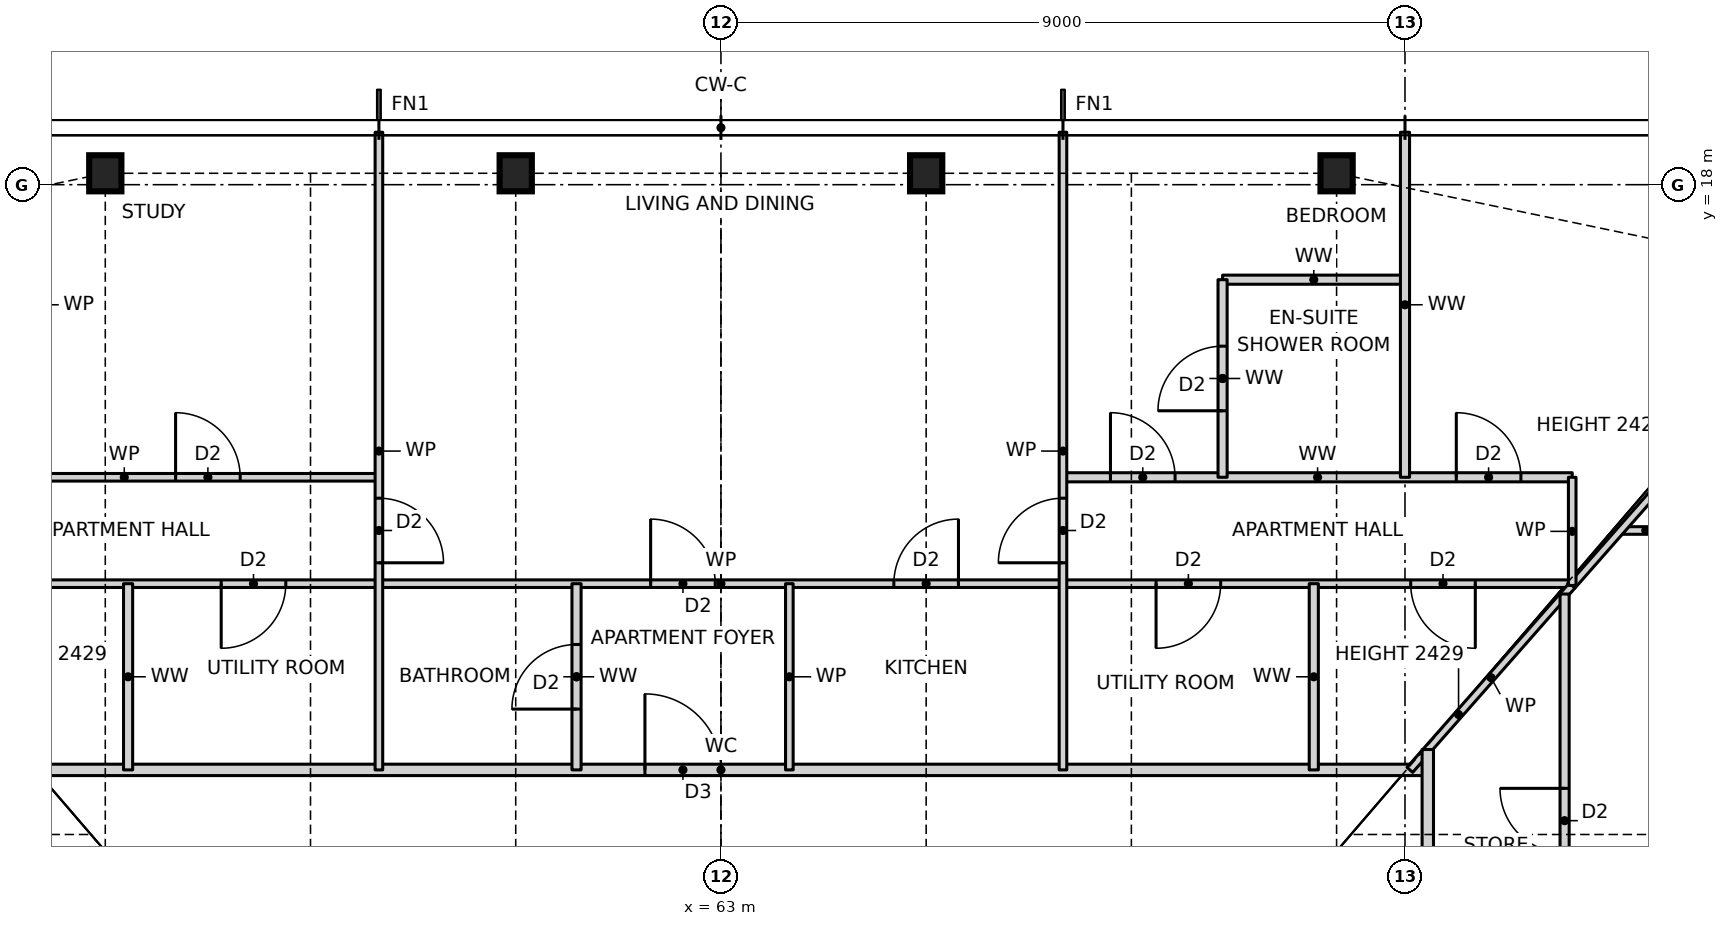
"""IFC4 building model, lengths in metres.
Left out: names, types, materials, properties, quantities, classifications, styles, units other than length and angle.
Written with IfcOpenShell. Run it as: python <this file> out.ifc"""

import sys

from ifc_helpers import new_model, si_unit, direction, frame, frame_2d, origin, origin_2d, place, context, subcontext, project, spatial, rectangle, i_section, extrude, element, fill, save


model = new_model("IFC4")
c1 = context("Model", 3, precision=1e-05, world=origin(), true_north=direction((0.0, 1.0)))
c2 = subcontext(c1, "Body", "Model", "MODEL_VIEW")
j1 = project(units=[si_unit("LENGTHUNIT", "METRE"), si_unit("PLANEANGLEUNIT", "RADIAN")], contexts=[c1])
p1 = place(None, origin())
s1 = spatial("IfcSite", under=j1, at=p1, CompositionType="ELEMENT")
p2 = place(p1, origin())
s2 = spatial("IfcBuilding", under=s1, at=p2, CompositionType="ELEMENT")
p3 = place(p2, frame((0.0, 0.0, 18.5)))
s3 = spatial("IfcBuildingStorey", under=s2, at=p3, CompositionType="ELEMENT", Elevation=18.5)
for number, where, z_axis, x_axis in (
    (1, (71.1, 18.15, 0.0), (0.0, 0.0, 1.0), (1.0, 0.0, 0.0)),
    (2, (65.7, 18.15, 0.0), (0.0, 0.0, 1.0), (1.0, 0.0, 0.0)),
    (3, (60.3, 18.15, 0.0), (0.0, 0.0, 1.0), (1.0, 0.0, 0.0)),
    (4, (54.9, 18.15, 0.0), (0.0, 0.0, 1.0), (1.0, 0.0, 0.0)),
):
    element("IfcColumn", number, at=place(p3, frame(where, z_axis=z_axis, x_axis=x_axis)), inside=s3, PredefinedType="COLUMN", context=c2, shape_type="SweptSolid", body=[
        extrude(i_section(OverallWidth=0.424, OverallDepth=0.475, WebThickness=0.048, FlangeThickness=0.077, at=origin_2d()), origin(), (0.0, 0.0, 1.0), 3.5),
    ])
p4 = place(p3, frame((53.7, 10.3, 0.0), z_axis=(0.0, 0.0, 1.0), x_axis=(1.0, 0.0, 0.0)))
e5 = element("IfcWall", 5, at=p4, inside=s3, PredefinedType="PARTITIONING", context=c2, shape_type="SweptSolid", body=[
    extrude(rectangle(XDim=18.6, YDim=0.15, at=frame_2d((9.3, 0.0))), origin(), (0.0, 0.0, 1.0), 3.27),
])
p5 = place(p4, frame((8.3, 0.0, 0.0)))
e6 = element("IfcOpeningElement", 6, at=p5, cuts=e5, PredefinedType="OPENING", context=c2, shape_type="SweptSolid", body=[
    extrude(rectangle(XDim=1.0, YDim=2.1, at=frame_2d((0.5, 1.05))), frame((0.0, 0.085, 0.0), z_axis=(0.0, -1.0, 0.0), x_axis=(1.0, 0.0, 0.0)), (0.0, 0.0, 1.0), 0.17),
])
p6 = place(p3, frame((51.8, 12.75, 0.0), z_axis=(0.0, 0.0, 1.0), x_axis=(1.0, 0.0, 0.0)))
e7 = element("IfcWall", 7, at=p6, inside=s3, PredefinedType="PARTITIONING", context=c2, shape_type="SweptSolid", body=[
    extrude(rectangle(XDim=22.4, YDim=0.1, at=frame_2d((11.2, 0.0))), origin(), (0.0, 0.0, 1.0), 3.27),
])
p7 = place(p6, frame((13.475, 0.0, 0.0)))
e8 = element("IfcOpeningElement", 8, at=p7, cuts=e7, PredefinedType="OPENING", context=c2, shape_type="SweptSolid", body=[
    extrude(rectangle(XDim=0.85, YDim=2.1, at=frame_2d((0.425, 1.05))), frame((0.0, 0.06, 0.0), z_axis=(0.0, -1.0, 0.0), x_axis=(1.0, 0.0, 0.0)), (0.0, 0.0, 1.0), 0.12),
])
p8 = place(p6, frame((10.275, 0.0, 0.0)))
e9 = element("IfcOpeningElement", 9, at=p8, cuts=e7, PredefinedType="OPENING", context=c2, shape_type="SweptSolid", body=[
    extrude(rectangle(XDim=0.85, YDim=2.1, at=frame_2d((0.425, 1.05))), frame((0.0, 0.06, 0.0), z_axis=(0.0, -1.0, 0.0), x_axis=(1.0, 0.0, 0.0)), (0.0, 0.0, 1.0), 0.12),
])
p9 = place(p6, frame((16.925, 0.0, 0.0)))
e10 = element("IfcOpeningElement", 10, at=p9, cuts=e7, PredefinedType="OPENING", context=c2, shape_type="SweptSolid", body=[
    extrude(rectangle(XDim=0.85, YDim=2.1, at=frame_2d((0.425, 1.05))), frame((0.0, 0.06, 0.0), z_axis=(0.0, -1.0, 0.0), x_axis=(1.0, 0.0, 0.0)), (0.0, 0.0, 1.0), 0.12),
])
p10 = place(p6, frame((20.275, 0.0, 0.0)))
e11 = element("IfcOpeningElement", 11, at=p10, cuts=e7, PredefinedType="OPENING", context=c2, shape_type="SweptSolid", body=[
    extrude(rectangle(XDim=0.85, YDim=2.1, at=frame_2d((0.425, 1.05))), frame((0.0, 0.06, 0.0), z_axis=(0.0, -1.0, 0.0), x_axis=(1.0, 0.0, 0.0)), (0.0, 0.0, 1.0), 0.12),
])
p11 = place(p6, frame((4.625, 0.0, 0.0)))
e12 = element("IfcOpeningElement", 12, at=p11, cuts=e7, PredefinedType="OPENING", context=c2, shape_type="SweptSolid", body=[
    extrude(rectangle(XDim=0.85, YDim=2.1, at=frame_2d((0.425, 1.05))), frame((0.0, 0.06, 0.0), z_axis=(0.0, -1.0, 0.0), x_axis=(1.0, 0.0, 0.0)), (0.0, 0.0, 1.0), 0.12),
])
p12 = place(p6, frame((1.275, 0.0, 0.0)))
e13 = element("IfcOpeningElement", 13, at=p12, cuts=e7, PredefinedType="OPENING", context=c2, shape_type="SweptSolid", body=[
    extrude(rectangle(XDim=0.85, YDim=2.1, at=frame_2d((0.425, 1.05))), frame((0.0, 0.06, 0.0), z_axis=(0.0, -1.0, 0.0), x_axis=(1.0, 0.0, 0.0)), (0.0, 0.0, 1.0), 0.12),
])
p13 = place(p3, frame((74.836, 13.45, 0.0), z_axis=(0.0, 0.0, 1.0), x_axis=(1.0, 0.0, 0.0)))
e14 = element("IfcWall", 14, at=p13, inside=s3, PredefinedType="PARTITIONING", context=c2, shape_type="SweptSolid", body=[
    extrude(rectangle(XDim=0.664, YDim=0.1, at=frame_2d((0.332, 0.0))), origin(), (0.0, 0.0, 1.0), 3.27),
])
p14 = place(p3, frame((51.8, 14.15, 0.0), z_axis=(0.0, 0.0, 1.0), x_axis=(1.0, 0.0, 0.0)))
e15 = element("IfcWall", 15, at=p14, inside=s3, PredefinedType="PARTITIONING", context=c2, shape_type="SweptSolid", body=[
    extrude(rectangle(XDim=6.7, YDim=0.1, at=frame_2d((3.35, 0.0))), origin(), (0.0, 0.0, 1.0), 3.27),
])
p15 = place(p14, frame((4.025, 0.0, 0.0)))
e16 = element("IfcOpeningElement", 16, at=p15, cuts=e15, PredefinedType="OPENING", context=c2, shape_type="SweptSolid", body=[
    extrude(rectangle(XDim=0.85, YDim=2.1, at=frame_2d((0.425, 1.05))), frame((0.0, 0.06, 0.0), z_axis=(0.0, -1.0, 0.0), x_axis=(1.0, 0.0, 0.0)), (0.0, 0.0, 1.0), 0.12),
])
p16 = place(p14, frame((0.675, 0.0, 0.0)))
e17 = element("IfcOpeningElement", 17, at=p16, cuts=e15, PredefinedType="OPENING", context=c2, shape_type="SweptSolid", body=[
    extrude(rectangle(XDim=0.85, YDim=2.1, at=frame_2d((0.425, 1.05))), frame((0.0, 0.06, 0.0), z_axis=(0.0, -1.0, 0.0), x_axis=(1.0, 0.0, 0.0)), (0.0, 0.0, 1.0), 0.12),
])
p17 = place(p3, frame((67.5, 14.15, 0.0), z_axis=(0.0, 0.0, 1.0), x_axis=(1.0, 0.0, 0.0)))
e18 = element("IfcWall", 18, at=p17, inside=s3, PredefinedType="PARTITIONING", context=c2, shape_type="SweptSolid", body=[
    extrude(rectangle(XDim=6.7, YDim=0.12, at=frame_2d((3.35, 0.0))), origin(), (0.0, 0.0, 1.0), 3.27),
])
p18 = place(p17, frame((0.625, 0.0, 0.0)))
e19 = element("IfcOpeningElement", 19, at=p18, cuts=e18, PredefinedType="OPENING", context=c2, shape_type="SweptSolid", body=[
    extrude(rectangle(XDim=0.85, YDim=2.1, at=frame_2d((0.425, 1.05))), frame((0.0, 0.07, 0.0), z_axis=(0.0, -1.0, 0.0), x_axis=(1.0, 0.0, 0.0)), (0.0, 0.0, 1.0), 0.14),
])
p19 = place(p17, frame((5.175, 0.0, 0.0)))
e20 = element("IfcOpeningElement", 20, at=p19, cuts=e18, PredefinedType="OPENING", context=c2, shape_type="SweptSolid", body=[
    extrude(rectangle(XDim=0.85, YDim=2.1, at=frame_2d((0.425, 1.05))), frame((0.0, 0.07, 0.0), z_axis=(0.0, -1.0, 0.0), x_axis=(1.0, 0.0, 0.0)), (0.0, 0.0, 1.0), 0.14),
])
p20 = place(p3, frame((69.6, 16.75, 0.0), z_axis=(0.0, 0.0, 1.0), x_axis=(1.0, 0.0, 0.0)))
e21 = element("IfcWall", 21, at=p20, inside=s3, PredefinedType="PARTITIONING", context=c2, shape_type="SweptSolid", body=[
    extrude(rectangle(XDim=2.4, YDim=0.12, at=frame_2d((1.2, 0.0))), origin(), (0.0, 0.0, 1.0), 3.27),
])
p21 = place(p3, frame((72.064, 10.3, 0.0), z_axis=(0.0, 0.0, 1.0), x_axis=(0.660667046586, 0.75067906162, 0.0)))
e22 = element("IfcWall", 22, at=p21, inside=s3, PredefinedType="PARTITIONING", context=c2, shape_type="SweptSolid", body=[
    extrude(rectangle(XDim=3.233, YDim=0.1, at=frame_2d((1.617, 0.0))), origin(), (0.0, 0.0, 1.0), 2.429),
])
p22 = place(p3, frame((74.2, 12.727, 0.0), z_axis=(0.0, 0.0, 1.0), x_axis=(0.660698595885, 0.750651294141, 0.0)))
e23 = element("IfcWall", 23, at=p22, inside=s3, PredefinedType="PARTITIONING", context=c2, shape_type="SweptSolid", body=[
    extrude(rectangle(XDim=5.838, YDim=0.1, at=frame_2d((2.919, 0.0))), origin(), (0.0, 0.0, 1.0), 2.429),
])
p23 = place(p3, frame((74.2, 12.727, 0.0), z_axis=(0.0, 0.0, 1.0), x_axis=(0.0, 1.0, 0.0)))
e24 = element("IfcWall", 24, at=p23, inside=s3, PredefinedType="PARTITIONING", context=c2, shape_type="SweptSolid", body=[
    extrude(rectangle(XDim=1.423, YDim=0.1, at=frame_2d((0.711, 0.0))), origin(), (0.0, 0.0, 1.0), 3.27),
])
p24 = place(p3, frame((74.1, -12.614, 0.0), z_axis=(0.0, 0.0, 1.0), x_axis=(0.0, 1.0, 0.0)))
e25 = element("IfcWall", 25, at=p24, inside=s3, PredefinedType="PARTITIONING", context=c2, shape_type="SweptSolid", body=[
    extrude(rectangle(XDim=25.228, YDim=0.12, at=frame_2d((12.614, 0.0))), origin(), (0.0, 0.0, 1.0), 3.27),
])
p25 = place(p24, frame((7.239, 0.0, 0.0)))
e26 = element("IfcOpeningElement", 26, at=p25, cuts=e25, PredefinedType="OPENING", context=c2, shape_type="SweptSolid", body=[
    extrude(rectangle(XDim=0.85, YDim=2.1, at=frame_2d((0.425, 1.05))), frame((0.0, 0.07, 0.0), z_axis=(0.0, -1.0, 0.0), x_axis=(1.0, 0.0, 0.0)), (0.0, 0.0, 1.0), 0.14),
])
p26 = place(p24, frame((10.439, 0.0, 0.0)))
e27 = element("IfcOpeningElement", 27, at=p26, cuts=e25, PredefinedType="OPENING", context=c2, shape_type="SweptSolid", body=[
    extrude(rectangle(XDim=0.85, YDim=2.1, at=frame_2d((0.425, 1.05))), frame((0.0, 0.07, 0.0), z_axis=(0.0, -1.0, 0.0), x_axis=(1.0, 0.0, 0.0)), (0.0, 0.0, 1.0), 0.14),
])
p27 = place(p24, frame((2.507, 0.0, 0.0)))
e28 = element("IfcOpeningElement", 28, at=p27, cuts=e25, PredefinedType="OPENING", context=c2, shape_type="SweptSolid", body=[
    extrude(rectangle(XDim=0.85, YDim=2.1, at=frame_2d((0.425, 1.05))), frame((0.0, 0.07, 0.0), z_axis=(0.0, -1.0, 0.0), x_axis=(1.0, 0.0, 0.0)), (0.0, 0.0, 1.0), 0.14),
])
p28 = place(p24, frame((16.639, 0.0, 0.0)))
e29 = element("IfcOpeningElement", 29, at=p28, cuts=e25, PredefinedType="OPENING", context=c2, shape_type="SweptSolid", body=[
    extrude(rectangle(XDim=0.85, YDim=2.1, at=frame_2d((0.425, 1.05))), frame((0.0, 0.07, 0.0), z_axis=(0.0, -1.0, 0.0), x_axis=(1.0, 0.0, 0.0)), (0.0, 0.0, 1.0), 0.14),
])
p29 = place(p24, frame((21.821, 0.0, 0.0)))
e30 = element("IfcOpeningElement", 30, at=p29, cuts=e25, PredefinedType="OPENING", context=c2, shape_type="SweptSolid", body=[
    extrude(rectangle(XDim=0.85, YDim=2.1, at=frame_2d((0.425, 1.05))), frame((0.0, 0.07, 0.0), z_axis=(0.0, -1.0, 0.0), x_axis=(1.0, 0.0, 0.0)), (0.0, 0.0, 1.0), 0.14),
])
p30 = place(p3, frame((72.3, -10.9, 0.0), z_axis=(0.0, 0.0, 1.0), x_axis=(0.0, 1.0, 0.0)))
e31 = element("IfcWall", 31, at=p30, inside=s3, PredefinedType="PARTITIONING", context=c2, shape_type="SweptSolid", body=[
    extrude(rectangle(XDim=21.468, YDim=0.15, at=frame_2d((10.734, 0.0))), origin(), (0.0, 0.0, 1.0), 3.27),
])
p31 = place(p30, frame((8.65, 0.0, 0.0)))
e32 = element("IfcOpeningElement", 32, at=p31, cuts=e31, PredefinedType="OPENING", context=c2, shape_type="SweptSolid", body=[
    extrude(rectangle(XDim=1.0, YDim=2.1, at=frame_2d((0.5, 1.05))), frame((0.0, 0.085, 0.0), z_axis=(0.0, -1.0, 0.0), x_axis=(1.0, 0.0, 0.0)), (0.0, 0.0, 1.0), 0.17),
])
p32 = place(p3, frame((72.0, 14.15, 0.0), z_axis=(0.0, 0.0, 1.0), x_axis=(0.0, 1.0, 0.0)))
e33 = element("IfcWall", 33, at=p32, inside=s3, PredefinedType="PARTITIONING", context=c2, shape_type="SweptSolid", body=[
    extrude(rectangle(XDim=4.54, YDim=0.12, at=frame_2d((2.27, 0.0))), origin(), (0.0, 0.0, 1.0), 3.27),
])
p33 = place(p3, frame((70.8, 10.3, 0.0), z_axis=(0.0, 0.0, 1.0), x_axis=(0.0, 1.0, 0.0)))
e34 = element("IfcWall", 34, at=p33, inside=s3, PredefinedType="PARTITIONING", context=c2, shape_type="SweptSolid", body=[
    extrude(rectangle(XDim=2.45, YDim=0.12, at=frame_2d((1.225, 0.0))), origin(), (0.0, 0.0, 1.0), 3.27),
])
p34 = place(p3, frame((69.6, 14.15, 0.0), z_axis=(0.0, 0.0, 1.0), x_axis=(0.0, 1.0, 0.0)))
e35 = element("IfcWall", 35, at=p34, inside=s3, PredefinedType="PARTITIONING", context=c2, shape_type="SweptSolid", body=[
    extrude(rectangle(XDim=2.6, YDim=0.12, at=frame_2d((1.3, 0.0))), origin(), (0.0, 0.0, 1.0), 3.27),
])
p35 = place(p34, frame((0.875, 0.0, 0.0)))
e36 = element("IfcOpeningElement", 36, at=p35, cuts=e35, PredefinedType="OPENING", context=c2, shape_type="SweptSolid", body=[
    extrude(rectangle(XDim=0.85, YDim=2.1, at=frame_2d((0.425, 1.05))), frame((0.0, 0.07, 0.0), z_axis=(0.0, -1.0, 0.0), x_axis=(1.0, 0.0, 0.0)), (0.0, 0.0, 1.0), 0.14),
])
p36 = place(p3, frame((67.5, 10.3, 0.0), z_axis=(0.0, 0.0, 1.0), x_axis=(0.0, 1.0, 0.0)))
e37 = element("IfcWall", 37, at=p36, inside=s3, PredefinedType="PARTITIONING", context=c2, shape_type="SweptSolid", body=[
    extrude(rectangle(XDim=8.39, YDim=0.1, at=frame_2d((4.195, 0.0))), origin(), (0.0, 0.0, 1.0), 3.27),
])
p37 = place(p36, frame((2.725, 0.0, 0.0)))
e38 = element("IfcOpeningElement", 38, at=p37, cuts=e37, PredefinedType="OPENING", context=c2, shape_type="SweptSolid", body=[
    extrude(rectangle(XDim=0.85, YDim=2.1, at=frame_2d((0.425, 1.05))), frame((0.0, 0.06, 0.0), z_axis=(0.0, -1.0, 0.0), x_axis=(1.0, 0.0, 0.0)), (0.0, 0.0, 1.0), 0.12),
])
p38 = place(p3, frame((63.9, 10.3, 0.0), z_axis=(0.0, 0.0, 1.0), x_axis=(0.0, 1.0, 0.0)))
e39 = element("IfcWall", 39, at=p38, inside=s3, PredefinedType="PARTITIONING", context=c2, shape_type="SweptSolid", body=[
    extrude(rectangle(XDim=2.45, YDim=0.1, at=frame_2d((1.225, 0.0))), origin(), (0.0, 0.0, 1.0), 3.27),
])
p39 = place(p3, frame((61.1, 10.3, 0.0), z_axis=(0.0, 0.0, 1.0), x_axis=(0.0, 1.0, 0.0)))
e40 = element("IfcWall", 40, at=p39, inside=s3, PredefinedType="PARTITIONING", context=c2, shape_type="SweptSolid", body=[
    extrude(rectangle(XDim=2.45, YDim=0.12, at=frame_2d((1.225, 0.0))), origin(), (0.0, 0.0, 1.0), 3.27),
])
p40 = place(p39, frame((0.8, 0.0, 0.0)))
e41 = element("IfcOpeningElement", 41, at=p40, cuts=e40, PredefinedType="OPENING", context=c2, shape_type="SweptSolid", body=[
    extrude(rectangle(XDim=0.85, YDim=2.1, at=frame_2d((0.425, 1.05))), frame((0.0, 0.07, 0.0), z_axis=(0.0, -1.0, 0.0), x_axis=(1.0, 0.0, 0.0)), (0.0, 0.0, 1.0), 0.14),
])
p41 = place(p3, frame((58.5, 10.3, 0.0), z_axis=(0.0, 0.0, 1.0), x_axis=(0.0, 1.0, 0.0)))
e42 = element("IfcWall", 42, at=p41, inside=s3, PredefinedType="PARTITIONING", context=c2, shape_type="SweptSolid", body=[
    extrude(rectangle(XDim=8.39, YDim=0.1, at=frame_2d((4.195, 0.0))), origin(), (0.0, 0.0, 1.0), 3.27),
])
p42 = place(p41, frame((2.725, 0.0, 0.0)))
e43 = element("IfcOpeningElement", 43, at=p42, cuts=e42, PredefinedType="OPENING", context=c2, shape_type="SweptSolid", body=[
    extrude(rectangle(XDim=0.85, YDim=2.1, at=frame_2d((0.425, 1.05))), frame((0.0, 0.06, 0.0), z_axis=(0.0, -1.0, 0.0), x_axis=(1.0, 0.0, 0.0)), (0.0, 0.0, 1.0), 0.12),
])
p43 = place(p3, frame((55.2, 10.3, 0.0), z_axis=(0.0, 0.0, 1.0), x_axis=(0.0, 1.0, 0.0)))
e44 = element("IfcWall", 44, at=p43, inside=s3, PredefinedType="PARTITIONING", context=c2, shape_type="SweptSolid", body=[
    extrude(rectangle(XDim=2.45, YDim=0.12, at=frame_2d((1.225, 0.0))), origin(), (0.0, 0.0, 1.0), 3.27),
])
p44 = place(p29, origin())
e45 = element("IfcDoor", 45, at=p44, inside=s3, OperationType="SINGLE_SWING_RIGHT", PredefinedType="DOOR", context=c2, shape_type="SweptSolid", body=[
    extrude(rectangle(XDim=0.85, YDim=2.1, at=frame_2d((0.425, 1.05))), frame((0.0, 0.025, 0.0), z_axis=(0.0, -1.0, 0.0), x_axis=(1.0, 0.0, 0.0)), (0.0, 0.0, 1.0), 0.05),
])
fill(e30, e45)
p45 = place(p7, origin())
e46 = element("IfcDoor", 46, at=p45, inside=s3, OperationType="SINGLE_SWING_RIGHT", PredefinedType="DOOR", context=c2, shape_type="SweptSolid", body=[
    extrude(rectangle(XDim=0.85, YDim=2.1, at=frame_2d((0.425, 1.05))), frame((0.0, 0.025, 0.0), z_axis=(0.0, -1.0, 0.0), x_axis=(1.0, 0.0, 0.0)), (0.0, 0.0, 1.0), 0.05),
])
fill(e8, e46)
p46 = place(p5, origin())
e47 = element("IfcDoor", 47, at=p46, inside=s3, OperationType="SINGLE_SWING_LEFT", PredefinedType="DOOR", context=c2, shape_type="SweptSolid", body=[
    extrude(rectangle(XDim=1.0, YDim=2.1, at=frame_2d((0.5, 1.05))), frame((0.0, 0.025, 0.0), z_axis=(0.0, -1.0, 0.0), x_axis=(1.0, 0.0, 0.0)), (0.0, 0.0, 1.0), 0.05),
])
fill(e6, e47)
p47 = place(p8, origin())
e48 = element("IfcDoor", 48, at=p47, inside=s3, OperationType="SINGLE_SWING_LEFT", PredefinedType="DOOR", context=c2, shape_type="SweptSolid", body=[
    extrude(rectangle(XDim=0.85, YDim=2.1, at=frame_2d((0.425, 1.05))), frame((0.0, 0.025, 0.0), z_axis=(0.0, -1.0, 0.0), x_axis=(1.0, 0.0, 0.0)), (0.0, 0.0, 1.0), 0.05),
])
fill(e9, e48)
p48 = place(p40, origin())
e49 = element("IfcDoor", 49, at=p48, inside=s3, OperationType="SINGLE_SWING_LEFT", PredefinedType="DOOR", context=c2, shape_type="SweptSolid", body=[
    extrude(rectangle(XDim=0.85, YDim=2.1, at=frame_2d((0.425, 1.05))), frame((0.0, 0.025, 0.0), z_axis=(0.0, -1.0, 0.0), x_axis=(1.0, 0.0, 0.0)), (0.0, 0.0, 1.0), 0.05),
])
fill(e41, e49)
p49 = place(p37, origin())
e50 = element("IfcDoor", 50, at=p49, inside=s3, OperationType="SINGLE_SWING_LEFT", PredefinedType="DOOR", context=c2, shape_type="SweptSolid", body=[
    extrude(rectangle(XDim=0.85, YDim=2.1, at=frame_2d((0.425, 1.05))), frame((0.0, 0.025, 0.0), z_axis=(0.0, -1.0, 0.0), x_axis=(1.0, 0.0, 0.0)), (0.0, 0.0, 1.0), 0.05),
])
fill(e38, e50)
p50 = place(p35, origin())
e51 = element("IfcDoor", 51, at=p50, inside=s3, OperationType="SINGLE_SWING_LEFT", PredefinedType="DOOR", context=c2, shape_type="SweptSolid", body=[
    extrude(rectangle(XDim=0.85, YDim=2.1, at=frame_2d((0.425, 1.05))), frame((0.0, 0.025, 0.0), z_axis=(0.0, -1.0, 0.0), x_axis=(1.0, 0.0, 0.0)), (0.0, 0.0, 1.0), 0.05),
])
fill(e36, e51)
p51 = place(p18, origin())
e52 = element("IfcDoor", 52, at=p51, inside=s3, OperationType="SINGLE_SWING_LEFT", PredefinedType="DOOR", context=c2, shape_type="SweptSolid", body=[
    extrude(rectangle(XDim=0.85, YDim=2.1, at=frame_2d((0.425, 1.05))), frame((0.0, 0.025, 0.0), z_axis=(0.0, -1.0, 0.0), x_axis=(1.0, 0.0, 0.0)), (0.0, 0.0, 1.0), 0.05),
])
fill(e19, e52)
p52 = place(p19, origin())
e53 = element("IfcDoor", 53, at=p52, inside=s3, OperationType="SINGLE_SWING_LEFT", PredefinedType="DOOR", context=c2, shape_type="SweptSolid", body=[
    extrude(rectangle(XDim=0.85, YDim=2.1, at=frame_2d((0.425, 1.05))), frame((0.0, 0.025, 0.0), z_axis=(0.0, -1.0, 0.0), x_axis=(1.0, 0.0, 0.0)), (0.0, 0.0, 1.0), 0.05),
])
fill(e20, e53)
p53 = place(p9, frame((0.85, 0.0, 0.0), z_axis=(0.0, 0.0, 1.0), x_axis=(-1.0, 0.0, 0.0)))
e54 = element("IfcDoor", 54, at=p53, inside=s3, OperationType="SINGLE_SWING_RIGHT", PredefinedType="DOOR", context=c2, shape_type="SweptSolid", body=[
    extrude(rectangle(XDim=0.85, YDim=2.1, at=frame_2d((0.425, 1.05))), frame((0.0, 0.025, 0.0), z_axis=(0.0, -1.0, 0.0), x_axis=(1.0, 0.0, 0.0)), (0.0, 0.0, 1.0), 0.05),
])
fill(e10, e54)
p54 = place(p10, frame((0.85, 0.0, 0.0), z_axis=(0.0, 0.0, 1.0), x_axis=(-1.0, 0.0, 0.0)))
e55 = element("IfcDoor", 55, at=p54, inside=s3, OperationType="SINGLE_SWING_LEFT", PredefinedType="DOOR", context=c2, shape_type="SweptSolid", body=[
    extrude(rectangle(XDim=0.85, YDim=2.1, at=frame_2d((0.425, 1.05))), frame((0.0, 0.025, 0.0), z_axis=(0.0, -1.0, 0.0), x_axis=(1.0, 0.0, 0.0)), (0.0, 0.0, 1.0), 0.05),
])
fill(e11, e55)
p55 = place(p42, frame((0.85, 0.0, 0.0), z_axis=(0.0, 0.0, 1.0), x_axis=(-1.0, 0.0, 0.0)))
e56 = element("IfcDoor", 56, at=p55, inside=s3, OperationType="SINGLE_SWING_RIGHT", PredefinedType="DOOR", context=c2, shape_type="SweptSolid", body=[
    extrude(rectangle(XDim=0.85, YDim=2.1, at=frame_2d((0.425, 1.05))), frame((0.0, 0.025, 0.0), z_axis=(0.0, -1.0, 0.0), x_axis=(1.0, 0.0, 0.0)), (0.0, 0.0, 1.0), 0.05),
])
fill(e43, e56)
p56 = place(p15, origin())
e57 = element("IfcDoor", 57, at=p56, inside=s3, OperationType="SINGLE_SWING_LEFT", PredefinedType="DOOR", context=c2, shape_type="SweptSolid", body=[
    extrude(rectangle(XDim=0.85, YDim=2.1, at=frame_2d((0.425, 1.05))), frame((0.0, 0.025, 0.0), z_axis=(0.0, -1.0, 0.0), x_axis=(1.0, 0.0, 0.0)), (0.0, 0.0, 1.0), 0.05),
])
fill(e16, e57)
p57 = place(p11, frame((0.85, 0.0, 0.0), z_axis=(0.0, 0.0, 1.0), x_axis=(-1.0, 0.0, 0.0)))
e58 = element("IfcDoor", 58, at=p57, inside=s3, OperationType="SINGLE_SWING_RIGHT", PredefinedType="DOOR", context=c2, shape_type="SweptSolid", body=[
    extrude(rectangle(XDim=0.85, YDim=2.1, at=frame_2d((0.425, 1.05))), frame((0.0, 0.025, 0.0), z_axis=(0.0, -1.0, 0.0), x_axis=(1.0, 0.0, 0.0)), (0.0, 0.0, 1.0), 0.05),
])
fill(e12, e58)
save(model, sys.argv[1])
